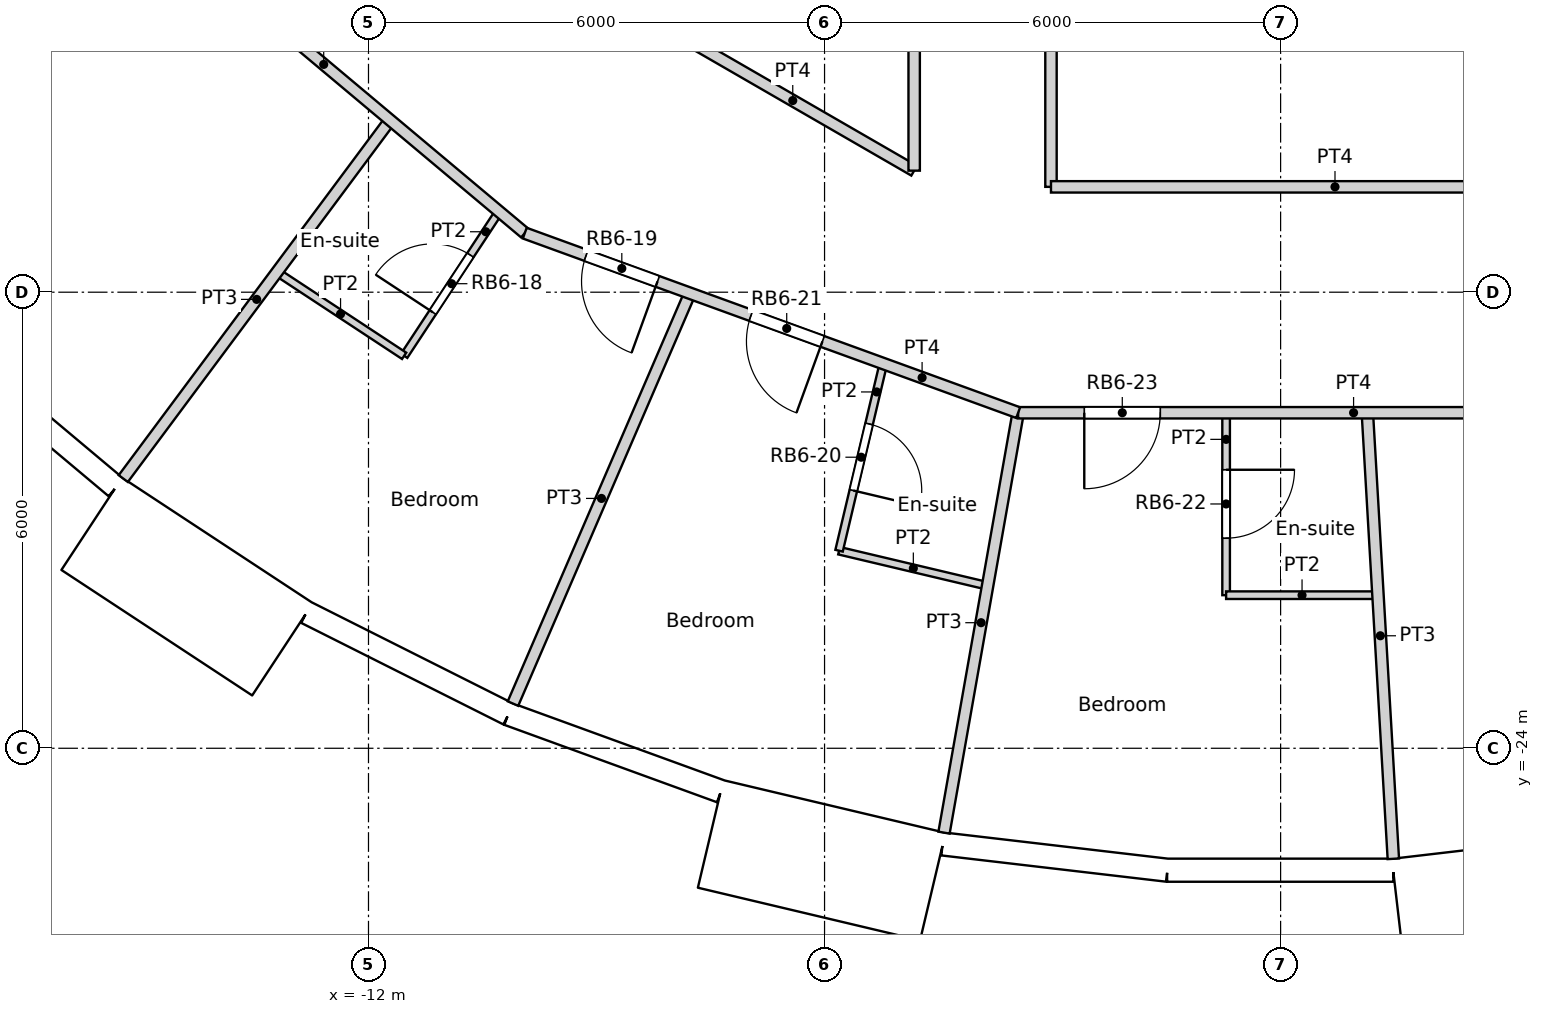
"""IFC4 building model, lengths in metres.
Left out: names, types, materials, properties, quantities, classifications, styles, units other than length and angle.
Written with IfcOpenShell. Run it as: python <this file> out.ifc"""

import sys

from ifc_helpers import new_model, si_unit, direction, frame, frame_2d, origin, origin_2d, place, context, subcontext, project, spatial, rectangle, circle, extrude, element, fill, save


model = new_model("IFC4")
c1 = context("Model", 3, precision=1e-05, world=origin(), true_north=direction((0.0, 1.0)))
c2 = subcontext(c1, "Body", "Model", "MODEL_VIEW")
j1 = project(units=[si_unit("LENGTHUNIT", "METRE"), si_unit("PLANEANGLEUNIT", "RADIAN")], contexts=[c1])
p1 = place(None, origin())
s1 = spatial("IfcSite", under=j1, at=p1, CompositionType="ELEMENT")
p2 = place(p1, origin())
s2 = spatial("IfcBuilding", under=s1, at=p2, CompositionType="ELEMENT")
p3 = place(p2, frame((0.0, 0.0, 180.0)))
s3 = spatial("IfcBuildingStorey", under=s2, at=p3, CompositionType="ELEMENT", Elevation=180.0)
for number, where, z_axis, x_axis in (
    (1, (-12.274, -21.259, 0.0), (0.0, 0.0, 1.0), (1.0, 0.0, 0.0)),
    (2, (-7.04, -23.516, 0.0), (0.0, 0.0, 1.0), (1.0, 0.0, 0.0)),
    (3, (-1.427, -24.506, 0.0), (0.0, 0.0, 1.0), (1.0, 0.0, 0.0)),
):
    element("IfcColumn", number, at=place(p3, frame(where, z_axis=z_axis, x_axis=x_axis)), inside=s3, PredefinedType="COLUMN", context=c2, shape_type="SweptSolid", body=[
        extrude(circle(Radius=0.6, at=origin_2d()), origin(), (0.0, 0.0, 1.0), 3.6),
    ])
for number, where, z_axis, x_axis in (
    (4, (-9.411, -16.301, 0.0), (0.0, 0.0, 1.0), (1.0, 0.0, 0.0)),
    (5, (-4.188, -18.35, 0.0), (0.0, 0.0, 1.0), (1.0, 0.0, 0.0)),
    (6, (1.406, -18.77, 0.0), (0.0, 0.0, 1.0), (1.0, 0.0, 0.0)),
):
    element("IfcColumn", number, at=place(p3, frame(where, z_axis=z_axis, x_axis=x_axis)), inside=s3, PredefinedType="COLUMN", context=c2, shape_type="SweptSolid", body=[
        extrude(circle(Radius=0.65, at=origin_2d()), origin(), (0.0, 0.0, 1.0), 3.6),
    ])
p4 = place(p3, frame((-17.6, -18.655, 0.0), z_axis=(0.0, 0.0, 1.0), x_axis=(0.766049350637, -0.642781761089, 0.0)))
e7 = element("IfcWall", 7, at=p4, inside=s3, PredefinedType="SOLIDWALL", context=c2, shape_type="SweptSolid", body=[
    extrude(rectangle(XDim=2.973, YDim=0.3, at=frame_2d((1.486, 0.0))), origin(), (0.0, 0.0, 1.0), 3.3),
])
p5 = place(p4, frame((1.486, 0.0, 1.55)))
e8 = element("IfcOpeningElement", 8, at=p5, cuts=e7, PredefinedType="OPENING", context=c2, shape_type="SweptSolid", body=[
    extrude(circle(Radius=0.9, at=origin_2d()), frame((0.0, 0.16, 0.0), z_axis=(0.0, -1.0, 0.0), x_axis=(1.0, 0.0, 0.0)), (0.0, 0.0, 1.0), 0.32),
])
p6 = place(p3, frame((-15.639, -21.048, -0.3), z_axis=(0.0, 0.0, 1.0), x_axis=(0.835514416706, -0.549468524554, 0.0)))
e9 = element("IfcWall", 9, at=p6, inside=s3, PredefinedType="ELEMENTEDWALL", context=c2, shape_type="SweptSolid", body=[
    extrude(rectangle(XDim=3.0, YDim=1.45, at=frame_2d((1.5, 0.0))), origin(), (0.0, 0.0, 1.0), 3.6),
])
p7 = place(p6, frame((1.5, 0.0, 1.85)))
e10 = element("IfcOpeningElement", 10, at=p7, cuts=e9, PredefinedType="OPENING", context=c2, shape_type="SweptSolid", body=[
    extrude(circle(Radius=0.9, at=origin_2d()), frame((0.0, 0.735, 0.0), z_axis=(0.0, -1.0, 0.0), x_axis=(1.0, 0.0, 0.0)), (0.0, 0.0, 1.0), 1.47),
])
p8 = place(p3, frame((-12.815, -22.216, 0.0), z_axis=(0.0, 0.0, 1.0), x_axis=(0.893637442555, -0.448789618045, 0.0)))
e11 = element("IfcWall", 11, at=p8, inside=s3, PredefinedType="SOLIDWALL", context=c2, shape_type="SweptSolid", body=[
    extrude(rectangle(XDim=2.973, YDim=0.3, at=frame_2d((1.486, 0.0))), origin(), (0.0, 0.0, 1.0), 3.3),
])
p9 = place(p8, frame((1.486, 0.0, 1.55)))
e12 = element("IfcOpeningElement", 12, at=p9, cuts=e11, PredefinedType="OPENING", context=c2, shape_type="SweptSolid", body=[
    extrude(circle(Radius=0.9, at=origin_2d()), frame((0.0, 0.16, 0.0), z_axis=(0.0, -1.0, 0.0), x_axis=(1.0, 0.0, 0.0)), (0.0, 0.0, 1.0), 0.32),
])
p10 = place(p3, frame((-10.158, -23.55, 0.0), z_axis=(0.0, 0.0, 1.0), x_axis=(0.939690282133, -0.342026568652, 0.0)))
e13 = element("IfcWall", 13, at=p10, inside=s3, PredefinedType="SOLIDWALL", context=c2, shape_type="SweptSolid", body=[
    extrude(rectangle(XDim=2.973, YDim=0.3, at=frame_2d((1.486, 0.0))), origin(), (0.0, 0.0, 1.0), 3.3),
])
p11 = place(p10, frame((1.486, 0.0, 1.55)))
e14 = element("IfcOpeningElement", 14, at=p11, cuts=e13, PredefinedType="OPENING", context=c2, shape_type="SweptSolid", body=[
    extrude(circle(Radius=0.9, at=origin_2d()), frame((0.0, 0.16, 0.0), z_axis=(0.0, -1.0, 0.0), x_axis=(1.0, 0.0, 0.0)), (0.0, 0.0, 1.0), 0.32),
])
p12 = place(p3, frame((-7.497, -25.127, -0.3), z_axis=(0.0, 0.0, 1.0), x_axis=(0.973042333261, -0.23062657627, 0.0)))
e15 = element("IfcWall", 15, at=p12, inside=s3, PredefinedType="ELEMENTEDWALL", context=c2, shape_type="SweptSolid", body=[
    extrude(rectangle(XDim=3.0, YDim=1.45, at=frame_2d((1.5, 0.0))), origin(), (0.0, 0.0, 1.0), 3.6),
])
p13 = place(p12, frame((1.5, 0.0, 1.85)))
e16 = element("IfcOpeningElement", 16, at=p13, cuts=e15, PredefinedType="OPENING", context=c2, shape_type="SweptSolid", body=[
    extrude(circle(Radius=0.9, at=origin_2d()), frame((0.0, 0.735, 0.0), z_axis=(0.0, -1.0, 0.0), x_axis=(1.0, 0.0, 0.0)), (0.0, 0.0, 1.0), 1.47),
])
p14 = place(p3, frame((-4.444, -25.259, 0.0), z_axis=(0.0, 0.0, 1.0), x_axis=(0.993245010522, -0.1160359818, 0.0)))
e17 = element("IfcWall", 17, at=p14, inside=s3, PredefinedType="SOLIDWALL", context=c2, shape_type="SweptSolid", body=[
    extrude(rectangle(XDim=2.973, YDim=0.3, at=frame_2d((1.486, 0.0))), origin(), (0.0, 0.0, 1.0), 3.3),
])
p15 = place(p14, frame((1.486, 0.0, 1.55)))
e18 = element("IfcOpeningElement", 18, at=p15, cuts=e17, PredefinedType="OPENING", context=c2, shape_type="SweptSolid", body=[
    extrude(circle(Radius=0.9, at=origin_2d()), frame((0.0, 0.16, 0.0), z_axis=(0.0, -1.0, 0.0), x_axis=(1.0, 0.0, 0.0)), (0.0, 0.0, 1.0), 0.32),
])
p16 = place(p3, frame((-1.491, -25.604, 0.0), z_axis=(0.0, 0.0, 1.0), x_axis=(1.0, 0.0, 0.0)))
e19 = element("IfcWall", 19, at=p16, inside=s3, PredefinedType="SOLIDWALL", context=c2, shape_type="SweptSolid", body=[
    extrude(rectangle(XDim=2.973, YDim=0.3, at=frame_2d((1.486, 0.0))), origin(), (0.0, 0.0, 1.0), 3.3),
])
p17 = place(p16, frame((1.486, 0.0, 1.55)))
e20 = element("IfcOpeningElement", 20, at=p17, cuts=e19, PredefinedType="OPENING", context=c2, shape_type="SweptSolid", body=[
    extrude(circle(Radius=0.9, at=origin_2d()), frame((0.0, 0.16, 0.0), z_axis=(0.0, -1.0, 0.0), x_axis=(1.0, 0.0, 0.0)), (0.0, 0.0, 1.0), 0.32),
])
p18 = place(p3, frame((1.549, -26.176, -0.3), z_axis=(0.0, 0.0, 1.0), x_axis=(0.9932342274, 0.116128246006, 0.0)))
e21 = element("IfcWall", 21, at=p18, inside=s3, PredefinedType="ELEMENTEDWALL", context=c2, shape_type="SweptSolid", body=[
    extrude(rectangle(XDim=3.0, YDim=1.45, at=frame_2d((1.5, 0.0))), origin(), (0.0, 0.0, 1.0), 3.6),
])
p19 = place(p18, frame((1.5, 0.0, 1.85)))
e22 = element("IfcOpeningElement", 22, at=p19, cuts=e21, PredefinedType="OPENING", context=c2, shape_type="SweptSolid", body=[
    extrude(circle(Radius=0.9, at=origin_2d()), frame((0.0, 0.735, 0.0), z_axis=(0.0, -1.0, 0.0), x_axis=(1.0, 0.0, 0.0)), (0.0, 0.0, 1.0), 1.47),
])
p20 = place(p3, frame((-15.235, -12.784, 0.0), z_axis=(0.0, 0.0, 1.0), x_axis=(0.766192104565, -0.642611592567, 0.0)))
e23 = element("IfcWall", 23, at=p20, inside=s3, PredefinedType="PARTITIONING", context=c2, shape_type="SweptSolid", body=[
    extrude(rectangle(XDim=6.906, YDim=0.15, at=frame_2d((3.453, 0.0))), origin(), (0.0, 0.0, 1.0), 3.3),
])
p21 = place(p3, frame((-12.162, -12.162, 0.0), z_axis=(0.0, 0.0, 1.0), x_axis=(0.866004766557, -0.500035743023, 0.0)))
e24 = element("IfcWall", 24, at=p21, inside=s3, PredefinedType="PARTITIONING", context=c2, shape_type="SweptSolid", body=[
    extrude(rectangle(XDim=8.477, YDim=0.15, at=frame_2d((4.239, 0.0))), origin(), (0.0, 0.0, 1.0), 3.3),
])
p22 = place(p21, frame((3.738, 0.0, 0.0)))
e25 = element("IfcOpeningElement", 25, at=p22, cuts=e24, PredefinedType="OPENING", context=c2, shape_type="SweptSolid", body=[
    extrude(rectangle(XDim=1.0, YDim=2.04, at=frame_2d((0.5, 1.02))), frame((0.0, 0.075, 0.0), z_axis=(0.0, -1.0, 0.0), x_axis=(1.0, 0.0, 0.0)), (0.0, 0.0, 1.0), 0.15),
])
p23 = place(p3, frame((-4.821, -16.401, 0.0), z_axis=(0.0, 0.0, 1.0), x_axis=(0.0, 1.0, 0.0)))
e26 = element("IfcWall", 26, at=p23, inside=s3, PredefinedType="PARTITIONING", context=c2, shape_type="SweptSolid", body=[
    extrude(rectangle(XDim=6.101, YDim=0.15, at=frame_2d((3.05, 0.0))), origin(), (0.0, 0.0, 1.0), 3.3),
])
p24 = place(p3, frame((-3.021, -16.614, 0.0), z_axis=(0.0, 0.0, 1.0), x_axis=(0.0, 1.0, 0.0)))
e27 = element("IfcWall", 27, at=p24, inside=s3, PredefinedType="PARTITIONING", context=c2, shape_type="SweptSolid", body=[
    extrude(rectangle(XDim=6.314, YDim=0.15, at=frame_2d((3.157, 0.0))), origin(), (0.0, 0.0, 1.0), 3.3),
])
p25 = place(p3, frame((-3.021, -16.614, 0.0), z_axis=(0.0, 0.0, 1.0), x_axis=(1.0, 0.0, 0.0)))
e28 = element("IfcWall", 28, at=p25, inside=s3, PredefinedType="PARTITIONING", context=c2, shape_type="SweptSolid", body=[
    extrude(rectangle(XDim=7.473, YDim=0.15, at=frame_2d((3.736, 0.0))), origin(), (0.0, 0.0, 1.0), 3.3),
])
p26 = place(p3, frame((-9.944, -17.223, 0.0), z_axis=(0.0, 0.0, 1.0), x_axis=(0.939737689664, -0.341896292208, 0.0)))
e29 = element("IfcWall", 29, at=p26, inside=s3, PredefinedType="PARTITIONING", context=c2, shape_type="SweptSolid", body=[
    extrude(rectangle(XDim=6.908, YDim=0.15, at=frame_2d((3.454, 0.0))), origin(), (0.0, 0.0, 1.0), 3.3),
])
p27 = place(p26, frame((0.859, 0.0, 0.0)))
e30 = element("IfcOpeningElement", 30, at=p27, cuts=e29, PredefinedType="OPENING", context=c2, shape_type="SweptSolid", body=[
    extrude(rectangle(XDim=1.0, YDim=2.1, at=frame_2d((0.5, 1.05))), frame((0.0, 0.075, 0.0), z_axis=(0.0, -1.0, 0.0), x_axis=(1.0, 0.0, 0.0)), (0.0, 0.0, 1.0), 0.15),
])
p28 = place(p26, frame((3.167, 0.0, 0.0)))
e31 = element("IfcOpeningElement", 31, at=p28, cuts=e29, PredefinedType="OPENING", context=c2, shape_type="SweptSolid", body=[
    extrude(rectangle(XDim=1.0, YDim=2.1, at=frame_2d((0.5, 1.05))), frame((0.0, 0.075, 0.0), z_axis=(0.0, -1.0, 0.0), x_axis=(1.0, 0.0, 0.0)), (0.0, 0.0, 1.0), 0.15),
])
p29 = place(p3, frame((-3.453, -19.586, 0.0), z_axis=(0.0, 0.0, 1.0), x_axis=(1.0, 0.0, 0.0)))
e32 = element("IfcWall", 32, at=p29, inside=s3, PredefinedType="PARTITIONING", context=c2, shape_type="SweptSolid", body=[
    extrude(rectangle(XDim=6.906, YDim=0.15, at=frame_2d((3.453, 0.0))), origin(), (0.0, 0.0, 1.0), 3.3),
])
p30 = place(p29, frame((0.87, 0.0, 0.0)))
e33 = element("IfcOpeningElement", 33, at=p30, cuts=e32, PredefinedType="OPENING", context=c2, shape_type="SweptSolid", body=[
    extrude(rectangle(XDim=1.0, YDim=2.1, at=frame_2d((0.5, 1.05))), frame((0.0, 0.075, 0.0), z_axis=(0.0, -1.0, 0.0), x_axis=(1.0, 0.0, 0.0)), (0.0, 0.0, 1.0), 0.15),
])
p31 = place(p3, frame((-15.226, -20.452, 0.0), z_axis=(0.0, 0.0, 1.0), x_axis=(0.597131981171, 0.802143002876, 0.0)))
e34 = element("IfcWall", 34, at=p31, inside=s3, PredefinedType="PARTITIONING", context=c2, shape_type="SweptSolid", body=[
    extrude(rectangle(XDim=5.878, YDim=0.15, at=frame_2d((2.939, 0.0))), origin(), (0.0, 0.0, 1.0), 3.3),
])
p32 = place(p3, frame((-13.204, -17.736, 0.0), z_axis=(0.0, 0.0, 1.0), x_axis=(0.835392041163, -0.549654562032, 0.0)))
e35 = element("IfcWall", 35, at=p32, inside=s3, PredefinedType="PARTITIONING", context=c2, shape_type="SweptSolid", body=[
    extrude(rectangle(XDim=2.003, YDim=0.1, at=frame_2d((1.001, 0.0))), origin(), (0.0, 0.0, 1.0), 3.3),
])
p33 = place(p3, frame((-11.531, -18.837, 0.0), z_axis=(0.0, 0.0, 1.0), x_axis=(0.549730960803, 0.83534176882, 0.0)))
e36 = element("IfcWall", 36, at=p33, inside=s3, PredefinedType="PARTITIONING", context=c2, shape_type="SweptSolid", body=[
    extrude(rectangle(XDim=2.272, YDim=0.1, at=frame_2d((1.136, 0.0))), origin(), (0.0, 0.0, 1.0), 3.3),
])
p34 = place(p33, frame((0.686, 0.0, 0.0)))
e37 = element("IfcOpeningElement", 37, at=p34, cuts=e36, PredefinedType="OPENING", context=c2, shape_type="SweptSolid", body=[
    extrude(rectangle(XDim=0.9, YDim=2.04, at=frame_2d((0.45, 1.02))), frame((0.0, 0.05, 0.0), z_axis=(0.0, -1.0, 0.0), x_axis=(1.0, 0.0, 0.0)), (0.0, 0.0, 1.0), 0.1),
])
p35 = place(p3, frame((-10.099, -23.412, 0.0), z_axis=(0.0, 0.0, 1.0), x_axis=(0.39601833725, 0.918242602236, 0.0)))
e38 = element("IfcWall", 38, at=p35, inside=s3, PredefinedType="PARTITIONING", context=c2, shape_type="SweptSolid", body=[
    extrude(rectangle(XDim=5.879, YDim=0.15, at=frame_2d((2.939, 0.0))), origin(), (0.0, 0.0, 1.0), 3.3),
])
p36 = place(p3, frame((-5.809, -21.401, 0.0), z_axis=(0.0, 0.0, 1.0), x_axis=(0.230524114202, 0.97306661271, 0.0)))
e39 = element("IfcWall", 39, at=p36, inside=s3, PredefinedType="PARTITIONING", context=c2, shape_type="SweptSolid", body=[
    extrude(rectangle(XDim=2.529, YDim=0.1, at=frame_2d((1.265, 0.0))), origin(), (0.0, 0.0, 1.0), 3.3),
])
p37 = place(p36, frame((0.814, 0.0, 0.0)))
e40 = element("IfcOpeningElement", 40, at=p37, cuts=e39, PredefinedType="OPENING", context=c2, shape_type="SweptSolid", body=[
    extrude(rectangle(XDim=0.9, YDim=2.04, at=frame_2d((0.45, 1.02))), frame((0.0, 0.05, 0.0), z_axis=(0.0, -1.0, 0.0), x_axis=(1.0, 0.0, 0.0)), (0.0, 0.0, 1.0), 0.1),
])
p38 = place(p3, frame((-5.809, -21.401, 0.0), z_axis=(0.0, 0.0, 1.0), x_axis=(0.973044402656, -0.230617845057, 0.0)))
e41 = element("IfcWall", 41, at=p38, inside=s3, PredefinedType="PARTITIONING", context=c2, shape_type="SweptSolid", body=[
    extrude(rectangle(XDim=2.008, YDim=0.1, at=frame_2d((1.004, 0.0))), origin(), (0.0, 0.0, 1.0), 3.3),
])
p39 = place(p3, frame((-4.428, -25.11, 0.0), z_axis=(0.0, 0.0, 1.0), x_axis=(0.17382754149, 0.984776109489, 0.0)))
e42 = element("IfcWall", 42, at=p39, inside=s3, PredefinedType="PARTITIONING", context=c2, shape_type="SweptSolid", body=[
    extrude(rectangle(XDim=5.61, YDim=0.15, at=frame_2d((2.805, 0.0))), origin(), (0.0, 0.0, 1.0), 3.3),
])
p40 = place(p3, frame((-0.717, -21.986, 0.0), z_axis=(0.0, 0.0, 1.0), x_axis=(0.0, 1.0, 0.0)))
e43 = element("IfcWall", 43, at=p40, inside=s3, PredefinedType="PARTITIONING", context=c2, shape_type="SweptSolid", body=[
    extrude(rectangle(XDim=2.4, YDim=0.1, at=frame_2d((1.2, 0.0))), origin(), (0.0, 0.0, 1.0), 3.3),
])
p41 = place(p40, frame((0.75, 0.0, 0.0)))
e44 = element("IfcOpeningElement", 44, at=p41, cuts=e43, PredefinedType="OPENING", context=c2, shape_type="SweptSolid", body=[
    extrude(rectangle(XDim=0.9, YDim=2.04, at=frame_2d((0.45, 1.02))), frame((0.0, 0.05, 0.0), z_axis=(0.0, -1.0, 0.0), x_axis=(1.0, 0.0, 0.0)), (0.0, 0.0, 1.0), 0.1),
])
p42 = place(p3, frame((-0.717, -21.986, 0.0), z_axis=(0.0, 0.0, 1.0), x_axis=(1.0, 0.0, 0.0)))
e45 = element("IfcWall", 45, at=p42, inside=s3, PredefinedType="PARTITIONING", context=c2, shape_type="SweptSolid", body=[
    extrude(rectangle(XDim=1.998, YDim=0.1, at=frame_2d((0.999, 0.0))), origin(), (0.0, 0.0, 1.0), 3.3),
])
p43 = place(p3, frame((1.141, -19.586, 0.0), z_axis=(0.0, 0.0, 1.0), x_axis=(0.058147412668, -0.998308007781, 0.0)))
e46 = element("IfcWall", 46, at=p43, inside=s3, PredefinedType="PARTITIONING", context=c2, shape_type="SweptSolid", body=[
    extrude(rectangle(XDim=5.878, YDim=0.15, at=frame_2d((2.939, 0.0))), origin(), (0.0, 0.0, 1.0), 3.3),
])
p44 = place(p5, origin())
e47 = element("IfcWindow", 47, at=p44, inside=s3, PartitioningType="SINGLE_PANEL", PredefinedType="WINDOW", context=c2, shape_type="SweptSolid", body=[
    extrude(circle(Radius=0.9, at=origin_2d()), frame((0.0, 0.12, 0.0), z_axis=(0.0, -1.0, 0.0), x_axis=(1.0, 0.0, 0.0)), (0.0, 0.0, 1.0), 0.1),
])
fill(e8, e47)
p45 = place(p7, origin())
e48 = element("IfcWindow", 48, at=p45, inside=s3, PartitioningType="SINGLE_PANEL", PredefinedType="WINDOW", context=c2, shape_type="SweptSolid", body=[
    extrude(circle(Radius=0.9, at=origin_2d()), frame((0.0, 0.695, 0.0), z_axis=(0.0, -1.0, 0.0), x_axis=(1.0, 0.0, 0.0)), (0.0, 0.0, 1.0), 0.1),
])
fill(e10, e48)
p46 = place(p9, origin())
e49 = element("IfcWindow", 49, at=p46, inside=s3, PartitioningType="SINGLE_PANEL", PredefinedType="WINDOW", context=c2, shape_type="SweptSolid", body=[
    extrude(circle(Radius=0.9, at=origin_2d()), frame((0.0, 0.12, 0.0), z_axis=(0.0, -1.0, 0.0), x_axis=(1.0, 0.0, 0.0)), (0.0, 0.0, 1.0), 0.1),
])
fill(e12, e49)
p47 = place(p11, origin())
e50 = element("IfcWindow", 50, at=p47, inside=s3, PartitioningType="SINGLE_PANEL", PredefinedType="WINDOW", context=c2, shape_type="SweptSolid", body=[
    extrude(circle(Radius=0.9, at=origin_2d()), frame((0.0, 0.12, 0.0), z_axis=(0.0, -1.0, 0.0), x_axis=(1.0, 0.0, 0.0)), (0.0, 0.0, 1.0), 0.1),
])
fill(e14, e50)
p48 = place(p13, origin())
e51 = element("IfcWindow", 51, at=p48, inside=s3, PartitioningType="SINGLE_PANEL", PredefinedType="WINDOW", context=c2, shape_type="SweptSolid", body=[
    extrude(circle(Radius=0.9, at=origin_2d()), frame((0.0, 0.695, 0.0), z_axis=(0.0, -1.0, 0.0), x_axis=(1.0, 0.0, 0.0)), (0.0, 0.0, 1.0), 0.1),
])
fill(e16, e51)
p49 = place(p15, origin())
e52 = element("IfcWindow", 52, at=p49, inside=s3, PartitioningType="SINGLE_PANEL", PredefinedType="WINDOW", context=c2, shape_type="SweptSolid", body=[
    extrude(circle(Radius=0.9, at=origin_2d()), frame((0.0, 0.12, 0.0), z_axis=(0.0, -1.0, 0.0), x_axis=(1.0, 0.0, 0.0)), (0.0, 0.0, 1.0), 0.1),
])
fill(e18, e52)
p50 = place(p17, origin())
e53 = element("IfcWindow", 53, at=p50, inside=s3, PartitioningType="SINGLE_PANEL", PredefinedType="WINDOW", context=c2, shape_type="SweptSolid", body=[
    extrude(circle(Radius=0.9, at=origin_2d()), frame((0.0, 0.12, 0.0), z_axis=(0.0, -1.0, 0.0), x_axis=(1.0, 0.0, 0.0)), (0.0, 0.0, 1.0), 0.1),
])
fill(e20, e53)
p51 = place(p19, origin())
e54 = element("IfcWindow", 54, at=p51, inside=s3, PartitioningType="SINGLE_PANEL", PredefinedType="WINDOW", context=c2, shape_type="SweptSolid", body=[
    extrude(circle(Radius=0.9, at=origin_2d()), frame((0.0, 0.695, 0.0), z_axis=(0.0, -1.0, 0.0), x_axis=(1.0, 0.0, 0.0)), (0.0, 0.0, 1.0), 0.1),
])
fill(e22, e54)
p52 = place(p34, origin())
e55 = element("IfcDoor", 55, at=p52, inside=s3, OperationType="SINGLE_SWING_LEFT", PredefinedType="DOOR", context=c2, shape_type="SweptSolid", body=[
    extrude(rectangle(XDim=0.9, YDim=2.04, at=frame_2d((0.45, 1.02))), frame((0.0, 0.025, 0.0), z_axis=(0.0, -1.0, 0.0), x_axis=(1.0, 0.0, 0.0)), (0.0, 0.0, 1.0), 0.05),
])
fill(e37, e55)
p53 = place(p27, origin())
e56 = element("IfcDoor", 56, at=p53, inside=s3, OperationType="SINGLE_SWING_LEFT", PredefinedType="DOOR", context=c2, shape_type="SweptSolid", body=[
    extrude(rectangle(XDim=1.0, YDim=2.1, at=frame_2d((0.5, 1.05))), frame((0.0, 0.025, 0.0), z_axis=(0.0, -1.0, 0.0), x_axis=(1.0, 0.0, 0.0)), (0.0, 0.0, 1.0), 0.05),
])
fill(e30, e56)
p54 = place(p37, origin())
e57 = element("IfcDoor", 57, at=p54, inside=s3, OperationType="SINGLE_SWING_RIGHT", PredefinedType="DOOR", context=c2, shape_type="SweptSolid", body=[
    extrude(rectangle(XDim=0.9, YDim=2.04, at=frame_2d((0.45, 1.02))), frame((0.0, 0.025, 0.0), z_axis=(0.0, -1.0, 0.0), x_axis=(1.0, 0.0, 0.0)), (0.0, 0.0, 1.0), 0.05),
])
fill(e40, e57)
p55 = place(p28, origin())
e58 = element("IfcDoor", 58, at=p55, inside=s3, OperationType="SINGLE_SWING_LEFT", PredefinedType="DOOR", context=c2, shape_type="SweptSolid", body=[
    extrude(rectangle(XDim=1.0, YDim=2.1, at=frame_2d((0.5, 1.05))), frame((0.0, 0.025, 0.0), z_axis=(0.0, -1.0, 0.0), x_axis=(1.0, 0.0, 0.0)), (0.0, 0.0, 1.0), 0.05),
])
fill(e31, e58)
p56 = place(p41, origin())
e59 = element("IfcDoor", 59, at=p56, inside=s3, OperationType="SINGLE_SWING_LEFT", PredefinedType="DOOR", context=c2, shape_type="SweptSolid", body=[
    extrude(rectangle(XDim=0.9, YDim=2.04, at=frame_2d((0.45, 1.02))), frame((0.0, 0.025, 0.0), z_axis=(0.0, -1.0, 0.0), x_axis=(1.0, 0.0, 0.0)), (0.0, 0.0, 1.0), 0.05),
])
fill(e44, e59)
p57 = place(p30, origin())
e60 = element("IfcDoor", 60, at=p57, inside=s3, OperationType="SINGLE_SWING_RIGHT", PredefinedType="DOOR", context=c2, shape_type="SweptSolid", body=[
    extrude(rectangle(XDim=1.0, YDim=2.1, at=frame_2d((0.5, 1.05))), frame((0.0, 0.025, 0.0), z_axis=(0.0, -1.0, 0.0), x_axis=(1.0, 0.0, 0.0)), (0.0, 0.0, 1.0), 0.05),
])
fill(e33, e60)
save(model, sys.argv[1])
